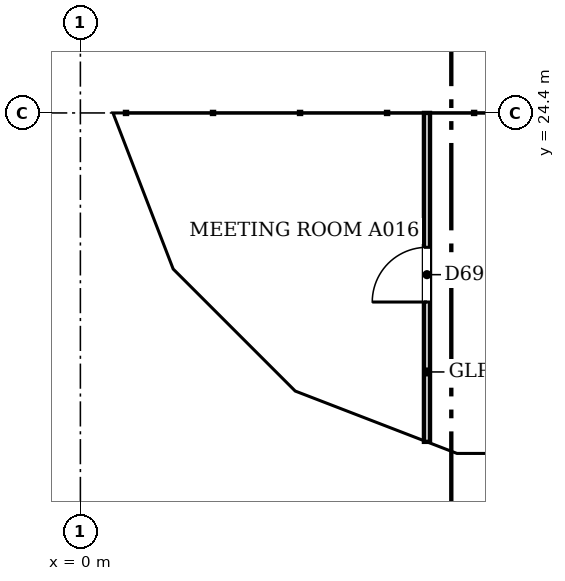
"""IFC4 building model, lengths in metres.
Left out: names, types, materials, properties, quantities, classifications, styles, units other than length and angle.
Written with IfcOpenShell. Run it as: python <this file> out.ifc"""

import sys

from ifc_helpers import new_model, si_unit, direction, frame, frame_2d, origin, place, context, subcontext, project, spatial, polyline, rectangle, outline, extrude, faceted_brep, source, transform, mapped, element, fill, save


model = new_model("IFC4")
c1 = context("Model", 3, precision=1e-05, world=origin(), true_north=direction((0.0, 1.0)))
c2 = subcontext(c1, "Body", "Model", "MODEL_VIEW")
j1 = project(units=[si_unit("LENGTHUNIT", "METRE"), si_unit("PLANEANGLEUNIT", "RADIAN")], contexts=[c1])
p1 = place(None, origin())
s1 = spatial("IfcSite", under=j1, at=p1, CompositionType="ELEMENT")
p2 = place(p1, origin())
s2 = spatial("IfcBuilding", under=s1, at=p2, CompositionType="ELEMENT")
p3 = place(p2, frame((0.0, 0.0, 189.6)))
s3 = spatial("IfcBuildingStorey", under=s2, at=p3, CompositionType="ELEMENT", Elevation=189.6)
m1 = source(origin(), c2, "Body", "Brep", [
    faceted_brep([(3.003, -0.25, 0.0), (3.05, -0.25, 0.06), (3.05, -0.25, 7.54), (3.003, -0.25, 7.6), (0.0, -0.25, 3.8), (0.0, 0.25, 3.8), (2.957, 0.25, 7.541), (2.957, 0.25, 0.059), (3.003, 0.0, 0.0), (3.003, 0.0, 7.6)], [[[0, 1, 2, 3, 4]], [[5, 6, 7]], [[1, 0, 8]], [[9, 3, 2]], [[6, 5, 4, 3, 9]], [[5, 7, 8, 0, 4]], [[1, 8, 7, 6, 9, 2]]]),
])
p4 = place(p3, frame((0.25, 27.45, -3.8), z_axis=(0.0, 0.0, 1.0), x_axis=(0.0, -1.0, 0.0)))
e1 = element("IfcWall", 1, at=p4, inside=s3, PredefinedType="SOLIDWALL", context=c2, shape_type="MappedRepresentation", body=[
    mapped(m1, transform((0.0, 0.0, 0.0), scale=1.0)),
])
m2 = source(origin(), c2, "Body", "SweptSolid", [
    extrude(outline(polyline([(2.803, 6.944), (0.319, 3.8), (2.803, 0.656), (2.803, 6.944)])), frame((0.0, 0.26, 0.0), z_axis=(0.0, -1.0, 0.0), x_axis=(1.0, 0.0, 0.0)), (0.0, 0.0, 1.0), 0.52),
])
p5 = place(p4, origin())
e2 = element("IfcOpeningElement", 2, at=p5, cuts=e1, PredefinedType="OPENING", context=c2, shape_type="MappedRepresentation", body=[
    mapped(m2, transform((0.0, 0.0, 0.0), scale=1.0)),
])
m3 = source(origin(), c2, "Body", "Brep", [
    faceted_brep([(0.047, -0.25, 0.0), (2.997, -0.25, 3.8), (0.047, -0.25, 7.6), (0.0, -0.25, 7.541), (0.0, -0.25, 0.059), (0.093, 0.25, 7.54), (2.944, 0.25, 3.868), (2.944, 0.25, 3.732), (0.093, 0.25, 0.06), (2.997, 0.0, 3.8), (0.047, 0.0, 0.0), (0.047, 0.0, 7.6)], [[[0, 1, 2, 3, 4]], [[5, 6, 7, 8]], [[8, 7, 9, 1, 0, 10]], [[6, 5, 11, 2, 1, 9]], [[3, 2, 11]], [[10, 0, 4]], [[8, 10, 4, 3, 11, 5]], [[7, 6, 9]]]),
])
p6 = place(p3, frame((0.233, 24.49, -3.8), z_axis=(0.0, 0.0, 1.0), x_axis=(0.359901446078, -0.932990326376, 0.0)))
e3 = element("IfcWall", 3, at=p6, inside=s3, PredefinedType="SOLIDWALL", context=c2, shape_type="MappedRepresentation", body=[
    mapped(m3, transform((0.0, 0.0, 0.0), scale=1.0)),
])
m4 = source(origin(), c2, "Body", "SweptSolid", [
    extrude(outline(polyline([(0.247, 0.665), (2.681, 3.8), (0.247, 6.935), (0.247, 0.665)])), frame((0.0, 0.26, 0.0), z_axis=(0.0, -1.0, 0.0), x_axis=(1.0, 0.0, 0.0)), (0.0, 0.0, 1.0), 0.52),
])
p7 = place(p6, origin())
e4 = element("IfcOpeningElement", 4, at=p7, cuts=e3, PredefinedType="OPENING", context=c2, shape_type="MappedRepresentation", body=[
    mapped(m4, transform((0.0, 0.0, 0.0), scale=1.0)),
])
m5 = source(origin(), c2, "Body", "Brep", [
    faceted_brep([(2.944, -0.25, 0.0), (2.997, -0.25, 0.068), (2.997, -0.25, 7.532), (2.944, -0.25, 7.6), (0.0, -0.25, 3.8), (0.053, 0.25, 3.868), (2.891, 0.25, 7.532), (2.891, 0.25, 0.068), (0.053, 0.25, 3.732), (2.944, 0.0, 0.0), (2.944, 0.0, 7.6), (0.0, 0.0, 3.8)], [[[0, 1, 2, 3, 4]], [[5, 6, 7, 8]], [[1, 0, 9]], [[10, 3, 2]], [[6, 5, 11, 4, 3, 10]], [[8, 7, 9, 0, 4, 11]], [[8, 11, 5]], [[1, 9, 7, 6, 10, 2]]]),
])
p8 = place(p3, frame((1.312, 21.694, -3.8), z_axis=(0.0, 0.0, 1.0), x_axis=(0.707066050402, -0.707147509625, 0.0)))
e5 = element("IfcWall", 5, at=p8, inside=s3, PredefinedType="SOLIDWALL", context=c2, shape_type="MappedRepresentation", body=[
    mapped(m5, transform((0.0, 0.0, 0.0), scale=1.0)),
])
m6 = source(origin(), c2, "Body", "SweptSolid", [
    extrude(outline(polyline([(2.744, 6.934), (0.316, 3.8), (2.744, 0.666), (2.744, 6.934)])), frame((0.0, 0.26, 0.0), z_axis=(0.0, -1.0, 0.0), x_axis=(1.0, 0.0, 0.0)), (0.0, 0.0, 1.0), 0.52),
])
p9 = place(p8, origin())
e6 = element("IfcOpeningElement", 6, at=p9, cuts=e5, PredefinedType="OPENING", context=c2, shape_type="MappedRepresentation", body=[
    mapped(m6, transform((0.0, 0.0, 0.0), scale=1.0)),
])
m7 = source(origin(), c2, "Body", "Brep", [
    faceted_brep([(0.053, -0.25, 0.0), (3.003, -0.25, 3.8), (0.053, -0.25, 7.6), (0.0, -0.25, 7.531), (0.0, -0.25, 0.068), (0.106, 0.25, 7.532), (2.957, 0.25, 3.86), (2.957, 0.25, 3.74), (0.106, 0.25, 0.068), (3.003, 0.0, 3.8), (0.053, 0.0, 0.0), (0.053, 0.0, 7.6)], [[[0, 1, 2, 3, 4]], [[5, 6, 7, 8]], [[8, 7, 9, 1, 0, 10]], [[6, 5, 11, 2, 1, 9]], [[3, 2, 11]], [[10, 0, 4]], [[8, 10, 4, 3, 11, 5]], [[7, 6, 9]]]),
])
p10 = place(p3, frame((3.344, 19.631, -3.8), z_axis=(0.0, 0.0, 1.0), x_axis=(0.933007896601, -0.359855894603, 0.0)))
e7 = element("IfcWall", 7, at=p10, inside=s3, PredefinedType="SOLIDWALL", context=c2, shape_type="MappedRepresentation", body=[
    mapped(m7, transform((0.0, 0.0, 0.0), scale=1.0)),
])
m8 = source(origin(), c2, "Body", "SweptSolid", [
    extrude(outline(polyline([(0.253, 0.665), (2.687, 3.8), (0.253, 6.935), (0.253, 0.665)])), frame((0.0, 0.26, 0.0), z_axis=(0.0, -1.0, 0.0), x_axis=(1.0, 0.0, 0.0)), (0.0, 0.0, 1.0), 0.52),
])
p11 = place(p10, origin())
e8 = element("IfcOpeningElement", 8, at=p11, cuts=e7, PredefinedType="OPENING", context=c2, shape_type="MappedRepresentation", body=[
    mapped(m8, transform((0.0, 0.0, 0.0), scale=1.0)),
])
m9 = source(origin(), c2, "Body", "Brep", [
    faceted_brep([(3.003, -0.25, 0.0), (6.053, -0.25, 3.8), (3.003, -0.25, 7.6), (0.0, -0.25, 3.8), (0.047, 0.25, 3.859), (3.003, 0.25, 7.6), (6.053, 0.25, 3.8), (3.003, 0.25, 0.0), (0.047, 0.25, 3.741), (0.0, 0.0, 3.8)], [[[0, 1, 2, 3]], [[4, 5, 6, 7, 8]], [[7, 6, 1, 0]], [[6, 5, 2, 1]], [[5, 4, 9, 3, 2]], [[8, 7, 0, 3, 9]], [[8, 9, 4]]]),
])
p12 = place(p3, frame((6.146, 18.55, -3.8), z_axis=(0.0, 0.0, 1.0), x_axis=(1.0, 0.0, 0.0)))
e9 = element("IfcWall", 9, at=p12, inside=s3, PredefinedType="SOLIDWALL", context=c2, shape_type="MappedRepresentation", body=[
    mapped(m9, transform((0.0, 0.0, 0.0), scale=1.0)),
])
m10 = source(origin(), c2, "Body", "SweptSolid", [
    extrude(outline(polyline([(3.005, 0.401), (5.733, 3.8), (3.005, 7.199), (0.319, 3.8), (3.005, 0.401)])), frame((0.0, 0.26, 0.0), z_axis=(0.0, -1.0, 0.0), x_axis=(1.0, 0.0, 0.0)), (0.0, 0.0, 1.0), 0.52),
])
p13 = place(p12, origin())
e10 = element("IfcOpeningElement", 10, at=p13, cuts=e9, PredefinedType="OPENING", context=c2, shape_type="MappedRepresentation", body=[
    mapped(m10, transform((0.0, 0.0, 0.0), scale=1.0)),
])
m11 = source(origin(), c2, "Body", "Brep", [
    faceted_brep([(3.05, -0.25, 0.0), (6.053, -0.25, 3.8), (0.0, -0.25, 3.8), (0.0, 0.25, 3.8), (6.007, 0.25, 3.8), (6.007, 0.25, 3.741), (3.05, 0.25, 0.0), (6.053, 0.0, 3.8)], [[[0, 1, 2]], [[3, 4, 5, 6]], [[6, 5, 7, 1, 0]], [[4, 3, 2, 1, 7]], [[3, 6, 0, 2]], [[5, 4, 7]]]),
])
p14 = place(p3, frame((0.25, 30.5, 0.0), z_axis=(0.0, 0.0, 1.0), x_axis=(0.0, -1.0, 0.0)))
e11 = element("IfcWall", 11, at=p14, inside=s3, PredefinedType="SOLIDWALL", context=c2, shape_type="MappedRepresentation", body=[
    mapped(m11, transform((0.0, 0.0, 0.0), scale=1.0)),
])
m12 = source(origin(), c2, "Body", "SweptSolid", [
    extrude(outline(polyline([(3.049, 0.401), (5.537, 3.55), (0.521, 3.55), (3.049, 0.401)])), frame((0.0, 0.26, 0.0), z_axis=(0.0, -1.0, 0.0), x_axis=(1.0, 0.0, 0.0)), (0.0, 0.0, 1.0), 0.52),
])
p15 = place(p14, origin())
e12 = element("IfcOpeningElement", 12, at=p15, cuts=e11, PredefinedType="OPENING", context=c2, shape_type="MappedRepresentation", body=[
    mapped(m12, transform((0.0, 0.0, 0.0), scale=1.0)),
])
m13 = source(origin(), c2, "Body", "Brep", [
    faceted_brep([(2.95, -0.25, 0.0), (3.003, -0.25, 0.068), (3.003, -0.25, 3.8), (0.0, -0.25, 3.8), (0.047, 0.25, 3.8), (2.898, 0.25, 3.8), (2.898, 0.25, 0.068), (0.047, 0.25, 3.74), (2.95, 0.0, 0.0), (0.0, 0.0, 3.8)], [[[0, 1, 2, 3]], [[4, 5, 6, 7]], [[1, 0, 8]], [[5, 4, 9, 3, 2]], [[7, 6, 8, 0, 3, 9]], [[7, 9, 4]], [[1, 8, 6, 5, 2]]]),
])
p16 = place(p3, frame((0.25, 24.447, 0.0), z_axis=(0.0, 0.0, 1.0), x_axis=(0.35992665181, -0.932980602862, 0.0)))
e13 = element("IfcWall", 13, at=p16, inside=s3, PredefinedType="SOLIDWALL", context=c2, shape_type="MappedRepresentation", body=[
    mapped(m13, transform((0.0, 0.0, 0.0), scale=1.0)),
])
m14 = source(origin(), c2, "Body", "SweptSolid", [
    extrude(outline(polyline([(2.75, 3.55), (0.511, 3.55), (2.75, 0.665), (2.75, 3.55)])), frame((0.0, 0.26, 0.0), z_axis=(0.0, -1.0, 0.0), x_axis=(1.0, 0.0, 0.0)), (0.0, 0.0, 1.0), 0.52),
])
p17 = place(p16, origin())
e14 = element("IfcOpeningElement", 14, at=p17, cuts=e13, PredefinedType="OPENING", context=c2, shape_type="MappedRepresentation", body=[
    mapped(m14, transform((0.0, 0.0, 0.0), scale=1.0)),
])
m15 = source(origin(), c2, "Body", "Brep", [
    faceted_brep([(0.053, -0.25, 0.0), (2.997, -0.25, 3.8), (0.0, -0.25, 3.8), (0.0, -0.25, 0.068), (0.106, 0.25, 3.8), (2.944, 0.25, 3.8), (2.944, 0.25, 3.732), (0.106, 0.25, 0.068), (2.997, 0.0, 3.8), (0.053, 0.0, 0.0)], [[[0, 1, 2, 3]], [[4, 5, 6, 7]], [[7, 6, 8, 1, 0, 9]], [[5, 4, 2, 1, 8]], [[9, 0, 3]], [[7, 9, 3, 2, 4]], [[6, 5, 8]]]),
])
p18 = place(p3, frame((1.274, 21.731, 0.0), z_axis=(0.0, 0.0, 1.0), x_axis=(0.707147509625, -0.707066050402, 0.0)))
e15 = element("IfcWall", 15, at=p18, inside=s3, PredefinedType="SOLIDWALL", context=c2, shape_type="MappedRepresentation", body=[
    mapped(m15, transform((0.0, 0.0, 0.0), scale=1.0)),
])
m16 = source(origin(), c2, "Body", "SweptSolid", [
    extrude(outline(polyline([(0.253, 0.666), (2.487, 3.55), (0.253, 3.55), (0.253, 0.666)])), frame((0.0, 0.26, 0.0), z_axis=(0.0, -1.0, 0.0), x_axis=(1.0, 0.0, 0.0)), (0.0, 0.0, 1.0), 0.52),
])
p19 = place(p18, origin())
e16 = element("IfcOpeningElement", 16, at=p19, cuts=e15, PredefinedType="OPENING", context=c2, shape_type="MappedRepresentation", body=[
    mapped(m16, transform((0.0, 0.0, 0.0), scale=1.0)),
])
m17 = source(origin(), c2, "Body", "Brep", [
    faceted_brep([(2.95, -0.25, 0.0), (2.997, -0.25, 0.059), (2.997, -0.25, 3.8), (0.0, -0.25, 3.8), (0.053, 0.25, 3.8), (2.904, 0.25, 3.8), (2.904, 0.25, 0.06), (0.053, 0.25, 3.732), (2.95, 0.0, 0.0), (0.0, 0.0, 3.8)], [[[0, 1, 2, 3]], [[4, 5, 6, 7]], [[1, 0, 8]], [[5, 4, 9, 3, 2]], [[7, 6, 8, 0, 3, 9]], [[7, 9, 4]], [[1, 8, 6, 5, 2]]]),
])
p20 = place(p3, frame((3.394, 19.612, 0.0), z_axis=(0.0, 0.0, 1.0), x_axis=(0.932990326376, -0.359901446078, 0.0)))
e17 = element("IfcWall", 17, at=p20, inside=s3, PredefinedType="SOLIDWALL", context=c2, shape_type="MappedRepresentation", body=[
    mapped(m17, transform((0.0, 0.0, 0.0), scale=1.0)),
])
p21 = place(p20, origin())
e18 = element("IfcOpeningElement", 18, at=p21, cuts=e17, PredefinedType="OPENING", context=c2, shape_type="MappedRepresentation", body=[
    mapped(m14, transform((0.0, 0.0, 0.0), scale=1.0)),
])
m18 = source(origin(), c2, "Body", "Brep", [
    faceted_brep([(0.047, -0.25, 0.0), (3.05, -0.25, 3.8), (0.0, -0.25, 3.8), (0.0, -0.25, 0.06), (0.093, 0.25, 3.8), (3.05, 0.25, 3.8), (0.093, 0.25, 0.059), (0.047, 0.0, 0.0)], [[[0, 1, 2, 3]], [[4, 5, 6]], [[6, 5, 1, 0, 7]], [[5, 4, 2, 1]], [[7, 0, 3]], [[6, 7, 3, 2, 4]]]),
])
p22 = place(p3, frame((6.1, 18.55, 0.0), z_axis=(0.0, 0.0, 1.0), x_axis=(1.0, 0.0, 0.0)))
e19 = element("IfcWall", 19, at=p22, inside=s3, PredefinedType="SOLIDWALL", context=c2, shape_type="MappedRepresentation", body=[
    mapped(m18, transform((0.0, 0.0, 0.0), scale=1.0)),
])
m19 = source(origin(), c2, "Body", "SweptSolid", [
    extrude(outline(polyline([(0.247, 0.656), (2.534, 3.55), (0.247, 3.55), (0.247, 0.656)])), frame((0.0, 0.26, 0.0), z_axis=(0.0, -1.0, 0.0), x_axis=(1.0, 0.0, 0.0)), (0.0, 0.0, 1.0), 0.52),
])
p23 = place(p22, origin())
e20 = element("IfcOpeningElement", 20, at=p23, cuts=e19, PredefinedType="OPENING", context=c2, shape_type="MappedRepresentation", body=[
    mapped(m19, transform((0.0, 0.0, 0.0), scale=1.0)),
])
p24 = place(p3, frame((5.7, 18.99, 0.0), z_axis=(0.0, 0.0, 1.0), x_axis=(0.0, 1.0, 0.0)))
e21 = element("IfcWall", 21, at=p24, inside=s3, PredefinedType="PARTITIONING", context=c2, shape_type="SweptSolid", body=[
    extrude(rectangle(XDim=5.41, YDim=0.1, at=frame_2d((2.705, 0.0))), origin(), (0.0, 0.0, 1.0), 2.947),
])
m20 = source(origin(), c2, "Body", "SweptSolid", [
    extrude(rectangle(XDim=0.9, YDim=2.1, at=frame_2d((0.45, 1.05))), frame((0.0, 0.06, 0.0), z_axis=(0.0, -1.0, 0.0), x_axis=(1.0, 0.0, 0.0)), (0.0, 0.0, 1.0), 0.12),
])
p25 = place(p24, frame((2.3, 0.0, 0.0)))
e22 = element("IfcOpeningElement", 22, at=p25, cuts=e21, PredefinedType="OPENING", context=c2, shape_type="MappedRepresentation", body=[
    mapped(m20, transform((0.0, 0.0, 0.0), scale=1.0)),
])
m21 = source(origin(), c2, "Body", "SweptSolid", [
    extrude(rectangle(XDim=0.9, YDim=2.1, at=frame_2d((0.45, 1.05))), frame((0.0, 0.025, 0.0), z_axis=(0.0, -1.0, 0.0), x_axis=(1.0, 0.0, 0.0)), (0.0, 0.0, 1.0), 0.05),
])
p26 = place(p25, origin())
e23 = element("IfcDoor", 23, at=p26, inside=s3, OperationType="SINGLE_SWING_LEFT", PredefinedType="DOOR", context=c2, shape_type="MappedRepresentation", body=[
    mapped(m21, transform((0.0, 0.0, 0.0), scale=1.0)),
])
fill(e22, e23)
save(model, sys.argv[1])
